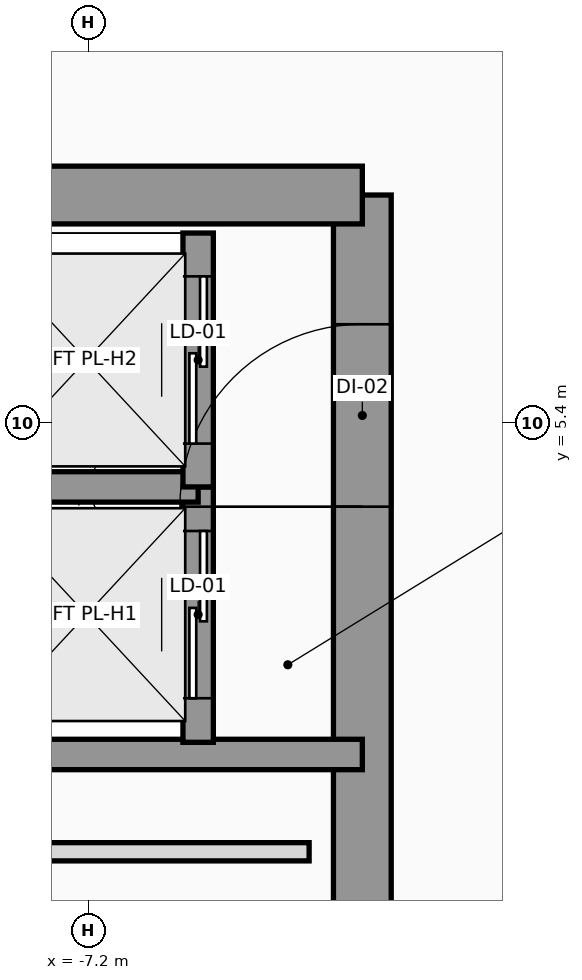
"""IFC4 building model, lengths in metres.
Left out: names, types, materials, properties, quantities, classifications, styles, units other than length and angle.
Written with IfcOpenShell. Run it as: python <this file> out.ifc"""

import sys

from ifc_helpers import new_model, si_unit, direction, frame, frame_2d, origin, place, context, subcontext, project, spatial, rectangle, extrude, source, transform, mapped, element, fill, save


model = new_model("IFC4")
c1 = context("Model", 3, precision=1e-05, world=origin(), true_north=direction((0.0, 1.0)))
c2 = subcontext(c1, "Body", "Model", "MODEL_VIEW")
j1 = project(units=[si_unit("LENGTHUNIT", "METRE"), si_unit("PLANEANGLEUNIT", "RADIAN")], contexts=[c1])
p1 = place(None, origin())
s1 = spatial("IfcSite", under=j1, at=p1, CompositionType="ELEMENT")
p2 = place(p1, origin())
s2 = spatial("IfcBuilding", under=s1, at=p2, CompositionType="ELEMENT")
p3 = place(p2, frame((0.0, 0.0, 184.2)))
s3 = spatial("IfcBuildingStorey", under=s2, at=p3, CompositionType="ELEMENT", Elevation=184.2)
p4 = place(p3, frame((-5.4, -5.6, 0.0), z_axis=(0.0, 0.0, 1.0), x_axis=(0.0, 1.0, 0.0)))
e1 = element("IfcWall", 1, at=p4, inside=s3, PredefinedType="SHEAR", context=c2, shape_type="SweptSolid", body=[
    extrude(rectangle(XDim=12.5, YDim=0.38, at=frame_2d((6.25, 0.0))), origin(), (0.0, 0.0, 1.0), 3.2),
])
p5 = place(p4, frame((4.55, 0.0, 0.0)))
e2 = element("IfcOpeningElement", 2, at=p5, cuts=e1, PredefinedType="OPENING", context=c2, shape_type="SweptSolid", body=[
    extrude(rectangle(XDim=1.2, YDim=2.2, at=frame_2d((0.6, 1.1))), frame((0.0, 0.2, 0.0), z_axis=(0.0, -1.0, 0.0), x_axis=(1.0, 0.0, 0.0)), (0.0, 0.0, 1.0), 0.4),
])
p6 = place(p4, frame((10.45, 0.0, 0.0)))
e3 = element("IfcOpeningElement", 3, at=p6, cuts=e1, PredefinedType="OPENING", context=c2, shape_type="SweptSolid", body=[
    extrude(rectangle(XDim=1.2, YDim=2.2, at=frame_2d((0.6, 1.1))), frame((0.0, 0.2, 0.0), z_axis=(0.0, -1.0, 0.0), x_axis=(1.0, 0.0, 0.0)), (0.0, 0.0, 1.0), 0.4),
])
p7 = place(p4, frame((6.86, 0.0, 0.0)))
e4 = element("IfcOpeningElement", 4, at=p7, cuts=e1, PredefinedType="OPENING", context=c2, shape_type="SweptSolid", body=[
    extrude(rectangle(XDim=0.8, YDim=2.1, at=frame_2d((0.4, 1.05))), frame((0.0, 0.2, 0.0), z_axis=(0.0, -1.0, 0.0), x_axis=(1.0, 0.0, 0.0)), (0.0, 0.0, 1.0), 0.4),
])
p8 = place(p3, frame((-11.356, 6.9, 0.0), z_axis=(0.0, 0.0, 1.0), x_axis=(1.0, 0.0, 0.0)))
e5 = element("IfcWall", 5, at=p8, inside=s3, PredefinedType="SHEAR", context=c2, shape_type="SweptSolid", body=[
    extrude(rectangle(XDim=5.956, YDim=0.38, at=frame_2d((2.978, 0.0))), origin(), (0.0, 0.0, 1.0), 3.2),
])
p9 = place(p3, frame((-8.18, 3.22, 0.0), z_axis=(0.0, 0.0, 1.0), x_axis=(1.0, 0.0, 0.0)))
e6 = element("IfcWall", 6, at=p9, inside=s3, PredefinedType="SOLIDWALL", context=c2, shape_type="SweptSolid", body=[
    extrude(rectangle(XDim=2.78, YDim=0.2, at=frame_2d((1.39, 0.0))), origin(), (0.0, 0.0, 1.0), 3.2),
])
p10 = place(p3, frame((-6.48, 3.3, 0.0), z_axis=(0.0, 0.0, 1.0), x_axis=(0.0, 1.0, 0.0)))
e7 = element("IfcWall", 7, at=p10, inside=s3, PredefinedType="SOLIDWALL", context=c2, shape_type="SweptSolid", body=[
    extrude(rectangle(XDim=1.68, YDim=0.2, at=frame_2d((0.84, 0.0))), origin(), (0.0, 0.0, 1.0), 3.2),
])
p11 = place(p10, frame((0.29, 0.0, 0.0)))
e8 = element("IfcOpeningElement", 8, at=p11, cuts=e7, PredefinedType="OPENING", context=c2, shape_type="SweptSolid", body=[
    extrude(rectangle(XDim=1.1, YDim=2.2, at=frame_2d((0.55, 1.1))), frame((0.0, 0.11, 0.0), z_axis=(0.0, -1.0, 0.0), x_axis=(1.0, 0.0, 0.0)), (0.0, 0.0, 1.0), 0.22),
])
p12 = place(p3, frame((-7.95, 4.98, 0.0), z_axis=(0.0, 0.0, 1.0), x_axis=(1.0, 0.0, 0.0)))
e9 = element("IfcWall", 9, at=p12, inside=s3, PredefinedType="SOLIDWALL", context=c2, shape_type="SweptSolid", body=[
    extrude(rectangle(XDim=1.47, YDim=0.2, at=frame_2d((0.735, 0.0))), origin(), (0.0, 0.0, 1.0), 3.2),
])
p13 = place(p3, frame((-6.48, 4.98, 0.0), z_axis=(0.0, 0.0, 1.0), x_axis=(0.0, 1.0, 0.0)))
e10 = element("IfcWall", 10, at=p13, inside=s3, PredefinedType="SOLIDWALL", context=c2, shape_type="SweptSolid", body=[
    extrude(rectangle(XDim=1.67, YDim=0.2, at=frame_2d((0.835, 0.0))), origin(), (0.0, 0.0, 1.0), 3.2),
])
p14 = place(p13, frame((0.285, 0.0, 0.0)))
e11 = element("IfcOpeningElement", 11, at=p14, cuts=e10, PredefinedType="OPENING", context=c2, shape_type="SweptSolid", body=[
    extrude(rectangle(XDim=1.1, YDim=2.2, at=frame_2d((0.55, 1.1))), frame((0.0, 0.11, 0.0), z_axis=(0.0, -1.0, 0.0), x_axis=(1.0, 0.0, 0.0)), (0.0, 0.0, 1.0), 0.22),
])
p15 = place(p3, frame((-8.14, 2.58, 0.0), z_axis=(0.0, 0.0, 1.0), x_axis=(1.0, 0.0, 0.0)))
e12 = element("IfcWall", 12, at=p15, inside=s3, PredefinedType="PARTITIONING", context=c2, shape_type="SweptSolid", body=[
    extrude(rectangle(XDim=2.39, YDim=0.12, at=frame_2d((1.195, 0.0))), origin(), (0.0, 0.0, 1.0), 2.3),
])
m1 = source(origin(), c2, "Body", "SweptSolid", [
    extrude(rectangle(XDim=1.2, YDim=2.2, at=frame_2d((0.6, 1.1))), frame((0.0, 0.025, 0.0), z_axis=(0.0, -1.0, 0.0), x_axis=(1.0, 0.0, 0.0)), (0.0, 0.0, 1.0), 0.05),
])
p16 = place(p6, origin())
e13 = element("IfcDoor", 13, at=p16, inside=s3, OperationType="SINGLE_SWING_LEFT", PredefinedType="DOOR", context=c2, shape_type="MappedRepresentation", body=[
    mapped(m1, transform((0.0, 0.0, 0.0), x_axis=(1.0, 0.0, 0.0), y_axis=(0.0, 1.0, 0.0), z_axis=(0.0, 0.0, 1.0), scale=1.0)),
])
fill(e3, e13)
m2 = source(origin(), c2, "Body", "SweptSolid", [
    extrude(rectangle(XDim=1.1, YDim=2.2, at=frame_2d((0.55, 1.1))), frame((0.0, 0.025, 0.0), z_axis=(0.0, -1.0, 0.0), x_axis=(1.0, 0.0, 0.0)), (0.0, 0.0, 1.0), 0.05),
])
p17 = place(p11, origin())
e14 = element("IfcDoor", 14, at=p17, inside=s3, OperationType="SLIDING_TO_LEFT", PredefinedType="DOOR", context=c2, shape_type="MappedRepresentation", body=[
    mapped(m2, transform((0.0, 0.0, 0.0), x_axis=(1.0, 0.0, 0.0), y_axis=(0.0, 1.0, 0.0), z_axis=(0.0, 0.0, 1.0), scale=1.0)),
])
fill(e8, e14)
p18 = place(p14, origin())
e15 = element("IfcDoor", 15, at=p18, inside=s3, OperationType="SLIDING_TO_LEFT", PredefinedType="DOOR", context=c2, shape_type="MappedRepresentation", body=[
    mapped(m2, transform((0.0, 0.0, 0.0), x_axis=(1.0, 0.0, 0.0), y_axis=(0.0, 1.0, 0.0), z_axis=(0.0, 0.0, 1.0), scale=1.0)),
])
fill(e11, e15)
save(model, sys.argv[1])
